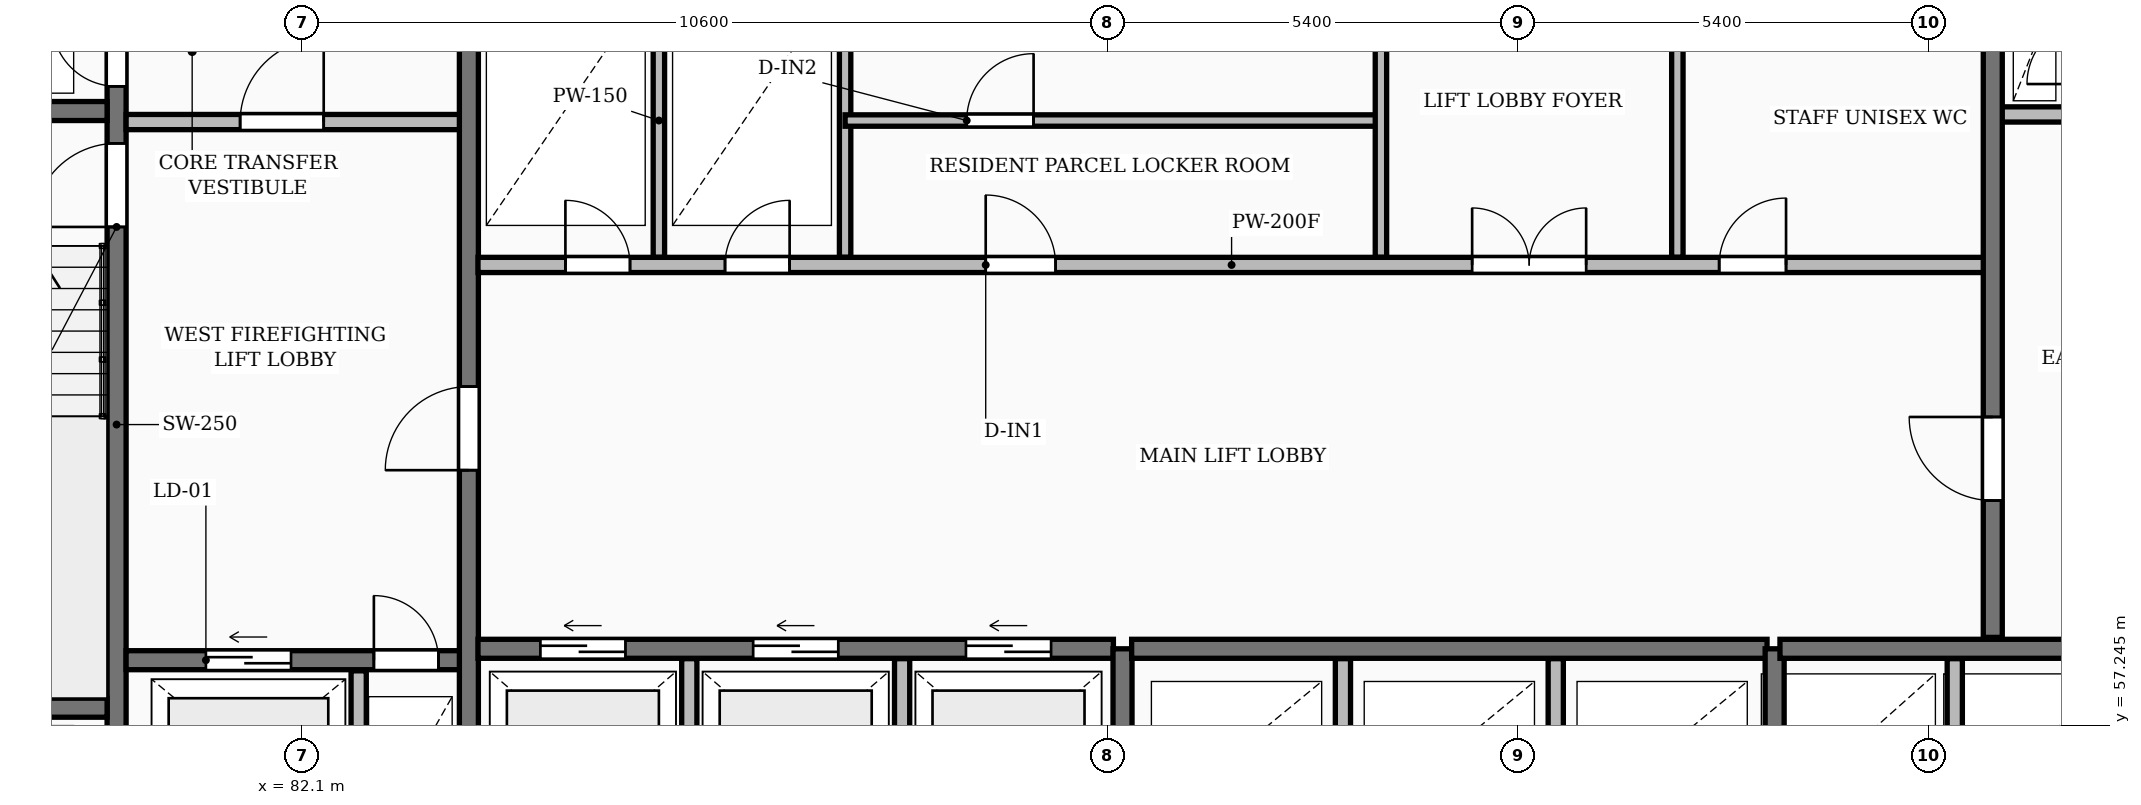
"""IFC4 building model, lengths in metres.
Left out: names, types, materials, properties, quantities, classifications, styles, units other than length and angle.
Written with IfcOpenShell. Run it as: python <this file> out.ifc"""

import sys

from ifc_helpers import new_model, si_unit, direction, frame, frame_2d, origin, place, context, subcontext, project, spatial, rectangle, extrude, element, fill, save


model = new_model("IFC4")
c1 = context("Model", 3, precision=1e-05, world=origin(), true_north=direction((0.0, 1.0)))
c2 = subcontext(c1, "Body", "Model", "MODEL_VIEW")
j1 = project(units=[si_unit("LENGTHUNIT", "METRE"), si_unit("PLANEANGLEUNIT", "RADIAN")], contexts=[c1])
p1 = place(None, origin())
s1 = spatial("IfcSite", under=j1, at=p1, CompositionType="ELEMENT")
p2 = place(p1, origin())
s2 = spatial("IfcBuilding", under=s1, at=p2, CompositionType="ELEMENT")
p3 = place(p2, frame((0.0, 0.0, 24.0)))
s3 = spatial("IfcBuildingStorey", under=s2, at=p3, CompositionType="ELEMENT", Elevation=24.0)
p4 = place(p3, frame((79.665, 55.4, 0.0), z_axis=(0.0, 0.0, 1.0), x_axis=(0.0, 1.0, 0.0)))
e1 = element("IfcWall", 1, at=p4, inside=s3, PredefinedType="SHEAR", context=c2, shape_type="SweptSolid", body=[
    extrude(rectangle(XDim=11.6, YDim=0.25, at=frame_2d((5.8, 0.0))), origin(), (0.0, 0.0, 1.0), 3.25),
])
p5 = place(p4, frame((0.55, 0.0, 0.0)))
e2 = element("IfcOpeningElement", 2, at=p5, cuts=e1, PredefinedType="OPENING", context=c2, shape_type="SweptSolid", body=[
    extrude(rectangle(XDim=0.85, YDim=2.05, at=frame_2d((0.425, 1.025))), frame((0.0, 0.135, 0.0), z_axis=(0.0, -1.0, 0.0), x_axis=(1.0, 0.0, 0.0)), (0.0, 0.0, 1.0), 0.27),
])
p6 = place(p4, frame((8.4, 0.0, 0.0)))
e3 = element("IfcOpeningElement", 3, at=p6, cuts=e1, PredefinedType="OPENING", context=c2, shape_type="SweptSolid", body=[
    extrude(rectangle(XDim=1.1, YDim=2.1, at=frame_2d((0.55, 1.05))), frame((0.0, 0.135, 0.0), z_axis=(0.0, -1.0, 0.0), x_axis=(1.0, 0.0, 0.0)), (0.0, 0.0, 1.0), 0.27),
])
p7 = place(p4, frame((10.25, 0.0, 0.0)))
e4 = element("IfcOpeningElement", 4, at=p7, cuts=e1, PredefinedType="OPENING", context=c2, shape_type="SweptSolid", body=[
    extrude(rectangle(XDim=0.85, YDim=2.05, at=frame_2d((0.425, 1.025))), frame((0.0, 0.135, 0.0), z_axis=(0.0, -1.0, 0.0), x_axis=(1.0, 0.0, 0.0)), (0.0, 0.0, 1.0), 0.27),
])
for number, where, z_axis, x_axis in (
    (5, (76.3, 57.475, 0.0), (0.0, 0.0, 1.0), (1.0, 0.0, 0.0)),
    (6, (76.3, 65.325, 0.0), (0.0, 0.0, 1.0), (1.0, 0.0, 0.0)),
):
    element("IfcWall", number, at=place(p3, frame(where, z_axis=z_axis, x_axis=x_axis)), inside=s3, PredefinedType="SHEAR", context=c2, shape_type="SweptSolid", body=[
        extrude(rectangle(XDim=3.24, YDim=0.25, at=frame_2d((1.62, 0.0))), origin(), (0.0, 0.0, 1.0), 3.25),
    ])
p8 = place(p3, frame((79.79, 58.1, 0.0), z_axis=(0.0, 0.0, 1.0), x_axis=(1.0, 0.0, 0.0)))
e7 = element("IfcWall", 7, at=p8, inside=s3, PredefinedType="SHEAR", context=c2, shape_type="SweptSolid", body=[
    extrude(rectangle(XDim=4.39, YDim=0.25, at=frame_2d((2.195, 0.0))), origin(), (0.0, 0.0, 1.0), 3.25),
])
p9 = place(p8, frame((1.05, 0.0, 0.0)))
e8 = element("IfcOpeningElement", 8, at=p9, cuts=e7, PredefinedType="OPENING", context=c2, shape_type="SweptSolid", body=[
    extrude(rectangle(XDim=1.12, YDim=2.12, at=frame_2d((0.56, 1.06))), frame((0.0, 0.135, 0.0), z_axis=(0.0, -1.0, 0.0), x_axis=(1.0, 0.0, 0.0)), (0.0, 0.0, 1.0), 0.27),
])
p10 = place(p8, frame((3.26, 0.0, 0.0)))
e9 = element("IfcOpeningElement", 9, at=p10, cuts=e7, PredefinedType="OPENING", context=c2, shape_type="SweptSolid", body=[
    extrude(rectangle(XDim=0.85, YDim=2.05, at=frame_2d((0.425, 1.025))), frame((0.0, 0.135, 0.0), z_axis=(0.0, -1.0, 0.0), x_axis=(1.0, 0.0, 0.0)), (0.0, 0.0, 1.0), 0.27),
])
p11 = place(p3, frame((82.85, 55.4, 0.0), z_axis=(0.0, 0.0, 1.0), x_axis=(0.0, 1.0, 0.0)))
e10 = element("IfcWall", 10, at=p11, inside=s3, PredefinedType="PARTITIONING", context=c2, shape_type="SweptSolid", body=[
    extrude(rectangle(XDim=2.56, YDim=0.2, at=frame_2d((1.28, 0.0))), origin(), (0.0, 0.0, 1.0), 2.97),
])
p12 = place(p3, frame((79.79, 65.18, 0.0), z_axis=(0.0, 0.0, 1.0), x_axis=(1.0, 0.0, 0.0)))
e11 = element("IfcWall", 11, at=p12, inside=s3, PredefinedType="PARTITIONING", context=c2, shape_type="SweptSolid", body=[
    extrude(rectangle(XDim=4.39, YDim=0.2, at=frame_2d((2.195, 0.0))), origin(), (0.0, 0.0, 1.0), 2.97),
])
p13 = place(p12, frame((1.5, 0.0, 0.0)))
e12 = element("IfcOpeningElement", 12, at=p13, cuts=e11, PredefinedType="OPENING", context=c2, shape_type="SweptSolid", body=[
    extrude(rectangle(XDim=1.1, YDim=2.1, at=frame_2d((0.55, 1.05))), frame((0.0, 0.11, 0.0), z_axis=(0.0, -1.0, 0.0), x_axis=(1.0, 0.0, 0.0)), (0.0, 0.0, 1.0), 0.22),
])
p14 = place(p3, frame((84.3, 55.4, 0.0), z_axis=(0.0, 0.0, 1.0), x_axis=(0.0, 1.0, 0.0)))
e13 = element("IfcWall", 13, at=p14, inside=s3, PredefinedType="SHEAR", context=c2, shape_type="SweptSolid", body=[
    extrude(rectangle(XDim=11.6, YDim=0.25, at=frame_2d((5.8, 0.0))), origin(), (0.0, 0.0, 1.0), 3.25),
])
p15 = place(p14, frame((5.2, 0.0, 0.0)))
e14 = element("IfcOpeningElement", 14, at=p15, cuts=e13, PredefinedType="OPENING", context=c2, shape_type="SweptSolid", body=[
    extrude(rectangle(XDim=1.1, YDim=2.1, at=frame_2d((0.55, 1.05))), frame((0.0, 0.135, 0.0), z_axis=(0.0, -1.0, 0.0), x_axis=(1.0, 0.0, 0.0)), (0.0, 0.0, 1.0), 0.27),
])
for number, where, z_axis, x_axis in (
    (15, (87.2, 55.4, 0.0), (0.0, 0.0, 1.0), (0.0, 1.0, 0.0)),
    (16, (90.0, 55.4, 0.0), (0.0, 0.0, 1.0), (0.0, 1.0, 0.0)),
):
    element("IfcWall", number, at=place(p3, frame(where, z_axis=z_axis, x_axis=x_axis)), inside=s3, PredefinedType="PARTITIONING", context=c2, shape_type="SweptSolid", body=[
        extrude(rectangle(XDim=2.72, YDim=0.2, at=frame_2d((1.36, 0.0))), origin(), (0.0, 0.0, 1.0), 2.97),
    ])
p16 = place(p3, frame((84.42, 58.25, 0.0), z_axis=(0.0, 0.0, 1.0), x_axis=(1.0, 0.0, 0.0)))
e17 = element("IfcWall", 17, at=p16, inside=s3, PredefinedType="SHEAR", context=c2, shape_type="SweptSolid", body=[
    extrude(rectangle(XDim=8.36, YDim=0.25, at=frame_2d((4.18, 0.0))), origin(), (0.0, 0.0, 1.0), 3.25),
])
p17 = place(p16, frame((0.82, 0.0, 0.0)))
e18 = element("IfcOpeningElement", 18, at=p17, cuts=e17, PredefinedType="OPENING", context=c2, shape_type="SweptSolid", body=[
    extrude(rectangle(XDim=1.12, YDim=2.12, at=frame_2d((0.56, 1.06))), frame((0.0, 0.135, 0.0), z_axis=(0.0, -1.0, 0.0), x_axis=(1.0, 0.0, 0.0)), (0.0, 0.0, 1.0), 0.27),
])
p18 = place(p16, frame((3.62, 0.0, 0.0)))
e19 = element("IfcOpeningElement", 19, at=p18, cuts=e17, PredefinedType="OPENING", context=c2, shape_type="SweptSolid", body=[
    extrude(rectangle(XDim=1.12, YDim=2.12, at=frame_2d((0.56, 1.06))), frame((0.0, 0.135, 0.0), z_axis=(0.0, -1.0, 0.0), x_axis=(1.0, 0.0, 0.0)), (0.0, 0.0, 1.0), 0.27),
])
p19 = place(p16, frame((6.42, 0.0, 0.0)))
e20 = element("IfcOpeningElement", 20, at=p19, cuts=e17, PredefinedType="OPENING", context=c2, shape_type="SweptSolid", body=[
    extrude(rectangle(XDim=1.12, YDim=2.12, at=frame_2d((0.56, 1.06))), frame((0.0, 0.135, 0.0), z_axis=(0.0, -1.0, 0.0), x_axis=(1.0, 0.0, 0.0)), (0.0, 0.0, 1.0), 0.27),
])
p20 = place(p3, frame((92.9, 55.4, 0.0), z_axis=(0.0, 0.0, 1.0), x_axis=(0.0, 1.0, 0.0)))
e21 = element("IfcWall", 21, at=p20, inside=s3, PredefinedType="SHEAR", context=c2, shape_type="SweptSolid", body=[
    extrude(rectangle(XDim=2.85, YDim=0.25, at=frame_2d((1.425, 0.0))), origin(), (0.0, 0.0, 1.0), 3.25),
])
for number, where, z_axis, x_axis in (
    (22, (95.8, 55.4, 0.0), (0.0, 0.0, 1.0), (0.0, 1.0, 0.0)),
    (23, (98.6, 55.4, 0.0), (0.0, 0.0, 1.0), (0.0, 1.0, 0.0)),
):
    element("IfcWall", number, at=place(p3, frame(where, z_axis=z_axis, x_axis=x_axis)), inside=s3, PredefinedType="PARTITIONING", context=c2, shape_type="SweptSolid", body=[
        extrude(rectangle(XDim=2.72, YDim=0.2, at=frame_2d((1.36, 0.0))), origin(), (0.0, 0.0, 1.0), 2.97),
    ])
p21 = place(p3, frame((93.02, 58.25, 0.0), z_axis=(0.0, 0.0, 1.0), x_axis=(1.0, 0.0, 0.0)))
e24 = element("IfcWall", 24, at=p21, inside=s3, PredefinedType="SHEAR", context=c2, shape_type="SweptSolid", body=[
    extrude(rectangle(XDim=8.36, YDim=0.25, at=frame_2d((4.18, 0.0))), origin(), (0.0, 0.0, 1.0), 3.25),
])
p22 = place(p3, frame((101.48, 55.4, 0.0), z_axis=(0.0, 0.0, 1.0), x_axis=(0.0, 1.0, 0.0)))
e25 = element("IfcWall", 25, at=p22, inside=s3, PredefinedType="SHEAR", context=c2, shape_type="SweptSolid", body=[
    extrude(rectangle(XDim=2.85, YDim=0.25, at=frame_2d((1.425, 0.0))), origin(), (0.0, 0.0, 1.0), 3.25),
])
p23 = place(p3, frame((103.85, 55.4, 0.0), z_axis=(0.0, 0.0, 1.0), x_axis=(0.0, 1.0, 0.0)))
e26 = element("IfcWall", 26, at=p23, inside=s3, PredefinedType="PARTITIONING", context=c2, shape_type="SweptSolid", body=[
    extrude(rectangle(XDim=2.72, YDim=0.2, at=frame_2d((1.36, 0.0))), origin(), (0.0, 0.0, 1.0), 2.97),
])
p24 = place(p3, frame((101.55, 58.25, 0.0), z_axis=(0.0, 0.0, 1.0), x_axis=(1.0, 0.0, 0.0)))
e27 = element("IfcWall", 27, at=p24, inside=s3, PredefinedType="SHEAR", context=c2, shape_type="SweptSolid", body=[
    extrude(rectangle(XDim=4.6, YDim=0.25, at=frame_2d((2.3, 0.0))), origin(), (0.0, 0.0, 1.0), 3.25),
])
for number, where, z_axis, x_axis in (
    (28, (86.8, 63.4, 0.0), (0.0, 0.0, 1.0), (0.0, 1.0, 0.0)),
    (29, (89.25, 63.4, 0.0), (0.0, 0.0, 1.0), (0.0, 1.0, 0.0)),
):
    element("IfcWall", number, at=place(p3, frame(where, z_axis=z_axis, x_axis=x_axis)), inside=s3, PredefinedType="PARTITIONING", context=c2, shape_type="SweptSolid", body=[
        extrude(rectangle(XDim=3.6, YDim=0.15, at=frame_2d((1.8, 0.0))), origin(), (0.0, 0.0, 1.0), 2.97),
    ])
p25 = place(p3, frame((89.25, 65.2, 0.0), z_axis=(0.0, 0.0, 1.0), x_axis=(1.0, 0.0, 0.0)))
e30 = element("IfcWall", 30, at=p25, inside=s3, PredefinedType="PARTITIONING", context=c2, shape_type="SweptSolid", body=[
    extrude(rectangle(XDim=7.05, YDim=0.15, at=frame_2d((3.525, 0.0))), origin(), (0.0, 0.0, 1.0), 2.97),
])
p26 = place(p25, frame((1.6, 0.0, 0.0)))
e31 = element("IfcOpeningElement", 31, at=p26, cuts=e30, PredefinedType="OPENING", context=c2, shape_type="SweptSolid", body=[
    extrude(rectangle(XDim=0.88, YDim=2.06, at=frame_2d((0.44, 1.03))), frame((0.0, 0.085, 0.0), z_axis=(0.0, -1.0, 0.0), x_axis=(1.0, 0.0, 0.0)), (0.0, 0.0, 1.0), 0.17),
])
for number, where, z_axis, x_axis in (
    (32, (96.3, 63.4, 0.0), (0.0, 0.0, 1.0), (0.0, 1.0, 0.0)),
    (33, (100.2, 63.4, 0.0), (0.0, 0.0, 1.0), (0.0, 1.0, 0.0)),
):
    element("IfcWall", number, at=place(p3, frame(where, z_axis=z_axis, x_axis=x_axis)), inside=s3, PredefinedType="PARTITIONING", context=c2, shape_type="SweptSolid", body=[
        extrude(rectangle(XDim=3.6, YDim=0.15, at=frame_2d((1.8, 0.0))), origin(), (0.0, 0.0, 1.0), 2.97),
    ])
p27 = place(p3, frame((84.42, 63.3, 0.0), z_axis=(0.0, 0.0, 1.0), x_axis=(1.0, 0.0, 0.0)))
e34 = element("IfcWall", 34, at=p27, inside=s3, PredefinedType="PARTITIONING", context=c2, shape_type="SweptSolid", body=[
    extrude(rectangle(XDim=19.83, YDim=0.2, at=frame_2d((9.915, 0.0))), origin(), (0.0, 0.0, 1.0), 2.97),
])
p28 = place(p27, frame((1.15, 0.0, 0.0)))
e35 = element("IfcOpeningElement", 35, at=p28, cuts=e34, PredefinedType="OPENING", context=c2, shape_type="SweptSolid", body=[
    extrude(rectangle(XDim=0.85, YDim=2.05, at=frame_2d((0.425, 1.025))), frame((0.0, 0.11, 0.0), z_axis=(0.0, -1.0, 0.0), x_axis=(1.0, 0.0, 0.0)), (0.0, 0.0, 1.0), 0.22),
])
p29 = place(p27, frame((3.25, 0.0, 0.0)))
e36 = element("IfcOpeningElement", 36, at=p29, cuts=e34, PredefinedType="OPENING", context=c2, shape_type="SweptSolid", body=[
    extrude(rectangle(XDim=0.85, YDim=2.05, at=frame_2d((0.425, 1.025))), frame((0.0, 0.11, 0.0), z_axis=(0.0, -1.0, 0.0), x_axis=(1.0, 0.0, 0.0)), (0.0, 0.0, 1.0), 0.22),
])
p30 = place(p27, frame((13.08, 0.0, 0.0)))
e37 = element("IfcOpeningElement", 37, at=p30, cuts=e34, PredefinedType="OPENING", context=c2, shape_type="SweptSolid", body=[
    extrude(rectangle(XDim=1.5, YDim=2.2, at=frame_2d((0.75, 1.1))), frame((0.0, 0.11, 0.0), z_axis=(0.0, -1.0, 0.0), x_axis=(1.0, 0.0, 0.0)), (0.0, 0.0, 1.0), 0.22),
])
p31 = place(p27, frame((6.68, 0.0, 0.0)))
e38 = element("IfcOpeningElement", 38, at=p31, cuts=e34, PredefinedType="OPENING", context=c2, shape_type="SweptSolid", body=[
    extrude(rectangle(XDim=0.92, YDim=2.08, at=frame_2d((0.46, 1.04))), frame((0.0, 0.11, 0.0), z_axis=(0.0, -1.0, 0.0), x_axis=(1.0, 0.0, 0.0)), (0.0, 0.0, 1.0), 0.22),
])
p32 = place(p27, frame((16.33, 0.0, 0.0)))
e39 = element("IfcOpeningElement", 39, at=p32, cuts=e34, PredefinedType="OPENING", context=c2, shape_type="SweptSolid", body=[
    extrude(rectangle(XDim=0.88, YDim=2.06, at=frame_2d((0.44, 1.03))), frame((0.0, 0.11, 0.0), z_axis=(0.0, -1.0, 0.0), x_axis=(1.0, 0.0, 0.0)), (0.0, 0.0, 1.0), 0.22),
])
p33 = place(p3, frame((104.45, 65.28, 0.0), z_axis=(0.0, 0.0, 1.0), x_axis=(1.0, 0.0, 0.0)))
e40 = element("IfcWall", 40, at=p33, inside=s3, PredefinedType="PARTITIONING", context=c2, shape_type="SweptSolid", body=[
    extrude(rectangle(XDim=1.2, YDim=0.2, at=frame_2d((0.6, 0.0))), origin(), (0.0, 0.0, 1.0), 2.97),
])
p34 = place(p3, frame((104.35, 58.4, 0.0), z_axis=(0.0, 0.0, 1.0), x_axis=(0.0, 1.0, 0.0)))
e41 = element("IfcWall", 41, at=p34, inside=s3, PredefinedType="SHEAR", context=c2, shape_type="SweptSolid", body=[
    extrude(rectangle(XDim=8.6, YDim=0.25, at=frame_2d((4.3, 0.0))), origin(), (0.0, 0.0, 1.0), 3.25),
])
p35 = place(p34, frame((1.8, 0.0, 0.0)))
e42 = element("IfcOpeningElement", 42, at=p35, cuts=e41, PredefinedType="OPENING", context=c2, shape_type="SweptSolid", body=[
    extrude(rectangle(XDim=1.1, YDim=2.1, at=frame_2d((0.55, 1.05))), frame((0.0, 0.135, 0.0), z_axis=(0.0, -1.0, 0.0), x_axis=(1.0, 0.0, 0.0)), (0.0, 0.0, 1.0), 0.27),
])
p36 = place(p6, origin())
e43 = element("IfcDoor", 43, at=p36, inside=s3, OperationType="SINGLE_SWING_LEFT", PredefinedType="DOOR", context=c2, shape_type="SweptSolid", body=[
    extrude(rectangle(XDim=1.1, YDim=2.1, at=frame_2d((0.55, 1.05))), frame((0.0, 0.025, 0.0), z_axis=(0.0, -1.0, 0.0), x_axis=(1.0, 0.0, 0.0)), (0.0, 0.0, 1.0), 0.05),
])
fill(e3, e43)
p37 = place(p7, origin())
e44 = element("IfcDoor", 44, at=p37, inside=s3, OperationType="SINGLE_SWING_RIGHT", PredefinedType="DOOR", context=c2, shape_type="SweptSolid", body=[
    extrude(rectangle(XDim=0.85, YDim=2.05, at=frame_2d((0.425, 1.025))), frame((0.0, 0.025, 0.0), z_axis=(0.0, -1.0, 0.0), x_axis=(1.0, 0.0, 0.0)), (0.0, 0.0, 1.0), 0.05),
])
fill(e4, e44)
p38 = place(p9, origin())
e45 = element("IfcDoor", 45, at=p38, inside=s3, OperationType="SLIDING_TO_LEFT", PredefinedType="DOOR", context=c2, shape_type="SweptSolid", body=[
    extrude(rectangle(XDim=1.12, YDim=2.12, at=frame_2d((0.56, 1.06))), frame((0.0, 0.025, 0.0), z_axis=(0.0, -1.0, 0.0), x_axis=(1.0, 0.0, 0.0)), (0.0, 0.0, 1.0), 0.05),
])
fill(e8, e45)
p39 = place(p10, origin())
e46 = element("IfcDoor", 46, at=p39, inside=s3, OperationType="SINGLE_SWING_LEFT", PredefinedType="DOOR", context=c2, shape_type="SweptSolid", body=[
    extrude(rectangle(XDim=0.85, YDim=2.05, at=frame_2d((0.425, 1.025))), frame((0.0, 0.025, 0.0), z_axis=(0.0, -1.0, 0.0), x_axis=(1.0, 0.0, 0.0)), (0.0, 0.0, 1.0), 0.05),
])
fill(e9, e46)
p40 = place(p13, origin())
e47 = element("IfcDoor", 47, at=p40, inside=s3, OperationType="SINGLE_SWING_RIGHT", PredefinedType="DOOR", context=c2, shape_type="SweptSolid", body=[
    extrude(rectangle(XDim=1.1, YDim=2.1, at=frame_2d((0.55, 1.05))), frame((0.0, 0.025, 0.0), z_axis=(0.0, -1.0, 0.0), x_axis=(1.0, 0.0, 0.0)), (0.0, 0.0, 1.0), 0.05),
])
fill(e12, e47)
p41 = place(p15, origin())
e48 = element("IfcDoor", 48, at=p41, inside=s3, OperationType="SINGLE_SWING_LEFT", PredefinedType="DOOR", context=c2, shape_type="SweptSolid", body=[
    extrude(rectangle(XDim=1.1, YDim=2.1, at=frame_2d((0.55, 1.05))), frame((0.0, 0.025, 0.0), z_axis=(0.0, -1.0, 0.0), x_axis=(1.0, 0.0, 0.0)), (0.0, 0.0, 1.0), 0.05),
])
fill(e14, e48)
p42 = place(p17, origin())
e49 = element("IfcDoor", 49, at=p42, inside=s3, OperationType="SLIDING_TO_LEFT", PredefinedType="DOOR", context=c2, shape_type="SweptSolid", body=[
    extrude(rectangle(XDim=1.12, YDim=2.12, at=frame_2d((0.56, 1.06))), frame((0.0, 0.025, 0.0), z_axis=(0.0, -1.0, 0.0), x_axis=(1.0, 0.0, 0.0)), (0.0, 0.0, 1.0), 0.05),
])
fill(e18, e49)
p43 = place(p18, origin())
e50 = element("IfcDoor", 50, at=p43, inside=s3, OperationType="SLIDING_TO_LEFT", PredefinedType="DOOR", context=c2, shape_type="SweptSolid", body=[
    extrude(rectangle(XDim=1.12, YDim=2.12, at=frame_2d((0.56, 1.06))), frame((0.0, 0.025, 0.0), z_axis=(0.0, -1.0, 0.0), x_axis=(1.0, 0.0, 0.0)), (0.0, 0.0, 1.0), 0.05),
])
fill(e19, e50)
p44 = place(p19, origin())
e51 = element("IfcDoor", 51, at=p44, inside=s3, OperationType="SLIDING_TO_LEFT", PredefinedType="DOOR", context=c2, shape_type="SweptSolid", body=[
    extrude(rectangle(XDim=1.12, YDim=2.12, at=frame_2d((0.56, 1.06))), frame((0.0, 0.025, 0.0), z_axis=(0.0, -1.0, 0.0), x_axis=(1.0, 0.0, 0.0)), (0.0, 0.0, 1.0), 0.05),
])
fill(e20, e51)
p45 = place(p26, origin())
e52 = element("IfcDoor", 52, at=p45, inside=s3, OperationType="SINGLE_SWING_RIGHT", PredefinedType="DOOR", context=c2, shape_type="SweptSolid", body=[
    extrude(rectangle(XDim=0.88, YDim=2.06, at=frame_2d((0.44, 1.03))), frame((0.0, 0.025, 0.0), z_axis=(0.0, -1.0, 0.0), x_axis=(1.0, 0.0, 0.0)), (0.0, 0.0, 1.0), 0.05),
])
fill(e31, e52)
p46 = place(p28, origin())
e53 = element("IfcDoor", 53, at=p46, inside=s3, OperationType="SINGLE_SWING_LEFT", PredefinedType="DOOR", context=c2, shape_type="SweptSolid", body=[
    extrude(rectangle(XDim=0.85, YDim=2.05, at=frame_2d((0.425, 1.025))), frame((0.0, 0.025, 0.0), z_axis=(0.0, -1.0, 0.0), x_axis=(1.0, 0.0, 0.0)), (0.0, 0.0, 1.0), 0.05),
])
fill(e35, e53)
p47 = place(p29, origin())
e54 = element("IfcDoor", 54, at=p47, inside=s3, OperationType="SINGLE_SWING_RIGHT", PredefinedType="DOOR", context=c2, shape_type="SweptSolid", body=[
    extrude(rectangle(XDim=0.85, YDim=2.05, at=frame_2d((0.425, 1.025))), frame((0.0, 0.025, 0.0), z_axis=(0.0, -1.0, 0.0), x_axis=(1.0, 0.0, 0.0)), (0.0, 0.0, 1.0), 0.05),
])
fill(e36, e54)
p48 = place(p30, origin())
e55 = element("IfcDoor", 55, at=p48, inside=s3, OperationType="DOUBLE_DOOR_SINGLE_SWING", PredefinedType="DOOR", context=c2, shape_type="SweptSolid", body=[
    extrude(rectangle(XDim=1.5, YDim=2.2, at=frame_2d((0.75, 1.1))), frame((0.0, 0.025, 0.0), z_axis=(0.0, -1.0, 0.0), x_axis=(1.0, 0.0, 0.0)), (0.0, 0.0, 1.0), 0.05),
])
fill(e37, e55)
p49 = place(p31, origin())
e56 = element("IfcDoor", 56, at=p49, inside=s3, OperationType="SINGLE_SWING_LEFT", PredefinedType="DOOR", context=c2, shape_type="SweptSolid", body=[
    extrude(rectangle(XDim=0.92, YDim=2.08, at=frame_2d((0.46, 1.04))), frame((0.0, 0.025, 0.0), z_axis=(0.0, -1.0, 0.0), x_axis=(1.0, 0.0, 0.0)), (0.0, 0.0, 1.0), 0.05),
])
fill(e38, e56)
p50 = place(p32, origin())
e57 = element("IfcDoor", 57, at=p50, inside=s3, OperationType="SINGLE_SWING_RIGHT", PredefinedType="DOOR", context=c2, shape_type="SweptSolid", body=[
    extrude(rectangle(XDim=0.88, YDim=2.06, at=frame_2d((0.44, 1.03))), frame((0.0, 0.025, 0.0), z_axis=(0.0, -1.0, 0.0), x_axis=(1.0, 0.0, 0.0)), (0.0, 0.0, 1.0), 0.05),
])
fill(e39, e57)
p51 = place(p35, origin())
e58 = element("IfcDoor", 58, at=p51, inside=s3, OperationType="SINGLE_SWING_RIGHT", PredefinedType="DOOR", context=c2, shape_type="SweptSolid", body=[
    extrude(rectangle(XDim=1.1, YDim=2.1, at=frame_2d((0.55, 1.05))), frame((0.0, 0.025, 0.0), z_axis=(0.0, -1.0, 0.0), x_axis=(1.0, 0.0, 0.0)), (0.0, 0.0, 1.0), 0.05),
])
fill(e42, e58)
save(model, sys.argv[1])
